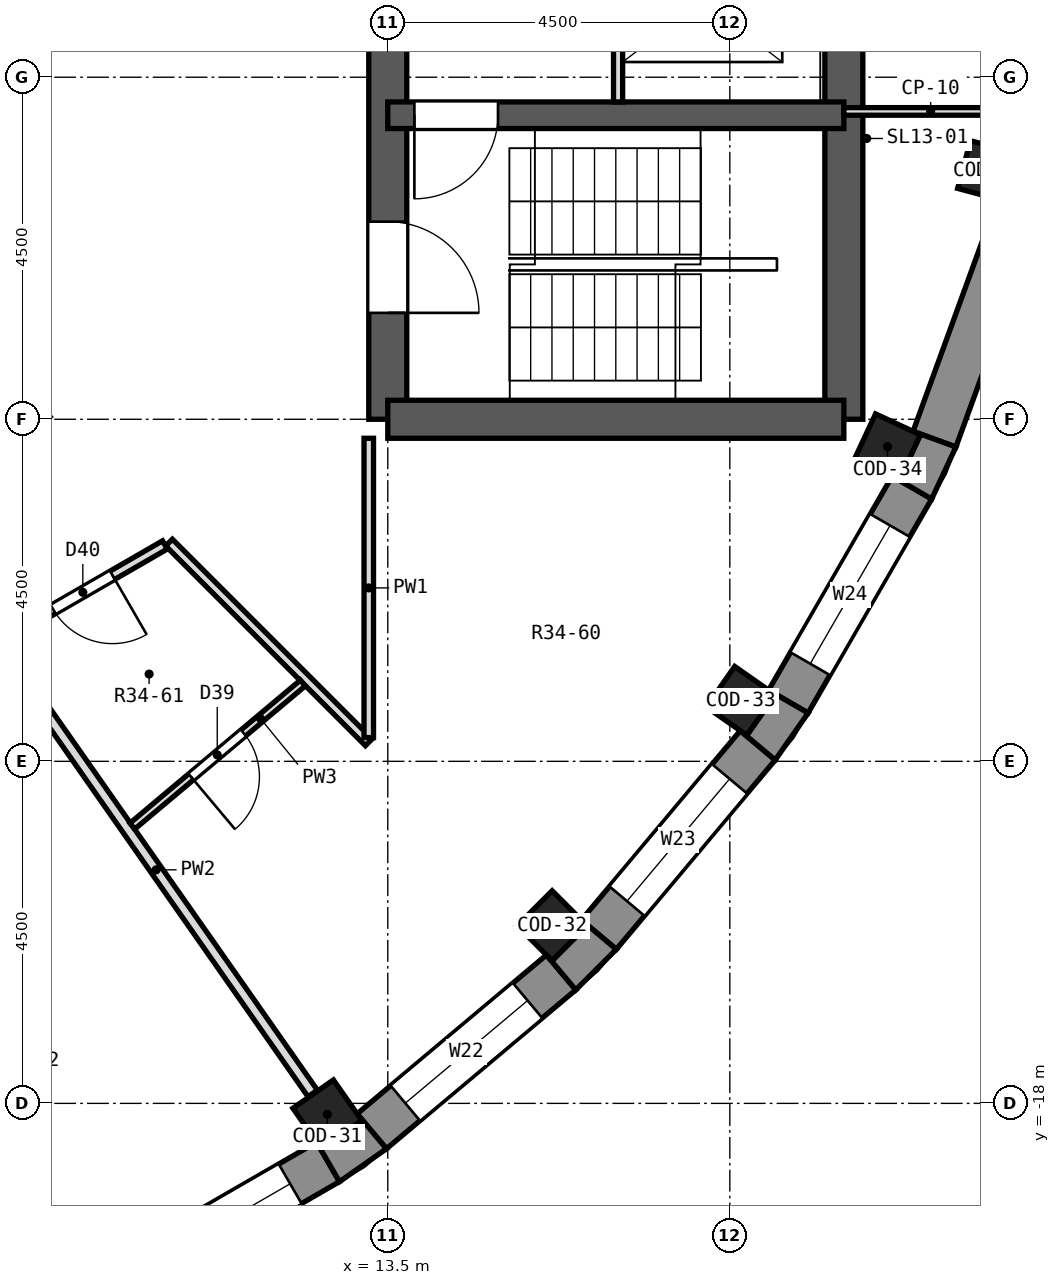
"""IFC4 building model, lengths in metres.
Left out: names, types, materials, properties, quantities, classifications, styles, units other than length and angle.
Written with IfcOpenShell. Run it as: python <this file> out.ifc"""

import sys

from ifc_helpers import new_model, si_unit, direction, frame, frame_2d, origin, origin_2d, place, context, subcontext, project, spatial, polyline, rectangle, outline, extrude, element, fill, save


model = new_model("IFC4")
c1 = context("Model", 3, precision=1e-05, world=origin(), true_north=direction((0.0, 1.0)))
c2 = subcontext(c1, "Body", "Model", "MODEL_VIEW")
j1 = project(units=[si_unit("LENGTHUNIT", "METRE"), si_unit("PLANEANGLEUNIT", "RADIAN")], contexts=[c1])
p1 = place(None, origin())
s1 = spatial("IfcSite", under=j1, at=p1, CompositionType="ELEMENT")
p2 = place(p1, origin())
s2 = spatial("IfcBuilding", under=s1, at=p2, CompositionType="ELEMENT")
p3 = place(p2, frame((0.0, 0.0, 239.6)))
s3 = spatial("IfcBuildingStorey", under=s2, at=p3, CompositionType="ELEMENT", Elevation=239.6)
for number, where, z_axis, x_axis in (
    (1, (12.705, -18.144, 0.0), (0.0, 0.0, 1.0), (0.574, -0.819, 0.0)),
    (2, (15.662, -15.662, 0.0), (0.0, 0.0, 1.0), (0.707, -0.707, 0.0)),
    (3, (18.144, -12.705, 0.0), (0.0, 0.0, 1.0), (0.819, -0.574, 0.0)),
    (4, (20.075, -9.361, 0.0), (0.0, 0.0, 1.0), (0.906, -0.423, 0.0)),
    (5, (21.395, -5.733, 0.0), (0.0, 0.0, 1.0), (0.966, -0.259, 0.0)),
):
    element("IfcColumn", number, at=place(p3, frame(where, z_axis=z_axis, x_axis=x_axis)), inside=s3, PredefinedType="COLUMN", context=c2, shape_type="SweptSolid", body=[
        extrude(rectangle(XDim=0.65, YDim=0.65, at=origin_2d()), origin(), (0.0, 0.0, 1.0), 3.3),
    ])
p4 = place(p3, frame((13.5, -9.0, 0.0), z_axis=(0.0, 0.0, 1.0), x_axis=(0.0, 1.0, 0.0)))
e6 = element("IfcWall", 6, at=p4, inside=s3, PredefinedType="SHEAR", context=c2, shape_type="SweptSolid", body=[
    extrude(rectangle(XDim=18.0, YDim=0.5, at=frame_2d((9.0, 0.0))), origin(), (0.0, 0.0, 1.0), 3.3),
])
p5 = place(p4, frame((15.4, 0.0, 0.0)))
e7 = element("IfcOpeningElement", 7, at=p5, cuts=e6, PredefinedType="OPENING", context=c2, shape_type="SweptSolid", body=[
    extrude(rectangle(XDim=1.2, YDim=2.1, at=frame_2d((0.6, 1.05))), frame((0.0, 0.262, 0.0), z_axis=(0.0, -1.0, 0.0), x_axis=(1.0, 0.0, 0.0)), (0.0, 0.0, 1.0), 0.524),
])
p6 = place(p4, frame((1.4, 0.0, 0.0)))
e8 = element("IfcOpeningElement", 8, at=p6, cuts=e6, PredefinedType="OPENING", context=c2, shape_type="SweptSolid", body=[
    extrude(rectangle(XDim=1.2, YDim=2.1, at=frame_2d((0.6, 1.05))), frame((0.0, 0.262, 0.0), z_axis=(0.0, -1.0, 0.0), x_axis=(1.0, 0.0, 0.0)), (0.0, 0.0, 1.0), 0.524),
])
p7 = place(p4, frame((7.5, 0.0, 0.0)))
e9 = element("IfcOpeningElement", 9, at=p7, cuts=e6, PredefinedType="OPENING", context=c2, shape_type="SweptSolid", body=[
    extrude(rectangle(XDim=3.0, YDim=2.4, at=frame_2d((1.5, 1.2))), frame((0.0, 0.262, 0.0), z_axis=(0.0, -1.0, 0.0), x_axis=(1.0, 0.0, 0.0)), (0.0, 0.0, 1.0), 0.524),
])
p8 = place(p3, frame((19.5, -9.0, 0.0), z_axis=(0.0, 0.0, 1.0), x_axis=(0.0, 1.0, 0.0)))
e10 = element("IfcWall", 10, at=p8, inside=s3, PredefinedType="SHEAR", context=c2, shape_type="SweptSolid", body=[
    extrude(rectangle(XDim=18.0, YDim=0.5, at=frame_2d((9.0, 0.0))), origin(), (0.0, 0.0, 1.0), 3.3),
])
p9 = place(p8, frame((9.45, 0.0, 0.0)))
e11 = element("IfcOpeningElement", 11, at=p9, cuts=e10, PredefinedType="OPENING", context=c2, shape_type="SweptSolid", body=[
    extrude(rectangle(XDim=0.9, YDim=2.1, at=frame_2d((0.45, 1.05))), frame((0.0, 0.262, 0.0), z_axis=(0.0, -1.0, 0.0), x_axis=(1.0, 0.0, 0.0)), (0.0, 0.0, 1.0), 0.524),
])
p10 = place(p8, frame((7.65, 0.0, 0.0)))
e12 = element("IfcOpeningElement", 12, at=p10, cuts=e10, PredefinedType="OPENING", context=c2, shape_type="SweptSolid", body=[
    extrude(rectangle(XDim=0.9, YDim=2.1, at=frame_2d((0.45, 1.05))), frame((0.0, 0.262, 0.0), z_axis=(0.0, -1.0, 0.0), x_axis=(1.0, 0.0, 0.0)), (0.0, 0.0, 1.0), 0.524),
])
p11 = place(p3, frame((13.5, -9.0, 0.0), z_axis=(0.0, 0.0, 1.0), x_axis=(1.0, 0.0, 0.0)))
e13 = element("IfcWall", 13, at=p11, inside=s3, PredefinedType="SHEAR", context=c2, shape_type="SweptSolid", body=[
    extrude(rectangle(XDim=6.0, YDim=0.5, at=frame_2d((3.0, 0.0))), origin(), (0.0, 0.0, 1.0), 3.3),
])
p12 = place(p3, frame((13.5, -5.0, 0.0), z_axis=(0.0, 0.0, 1.0), x_axis=(1.0, 0.0, 0.0)))
e14 = element("IfcWall", 14, at=p12, inside=s3, PredefinedType="SHEAR", context=c2, shape_type="SweptSolid", body=[
    extrude(rectangle(XDim=6.0, YDim=0.35, at=frame_2d((3.0, 0.0))), origin(), (0.0, 0.0, 1.0), 3.3),
])
p13 = place(p12, frame((0.35, 0.0, 0.0)))
e15 = element("IfcOpeningElement", 15, at=p13, cuts=e14, PredefinedType="OPENING", context=c2, shape_type="SweptSolid", body=[
    extrude(rectangle(XDim=1.1, YDim=2.1, at=frame_2d((0.55, 1.05))), frame((0.0, 0.187, 0.0), z_axis=(0.0, -1.0, 0.0), x_axis=(1.0, 0.0, 0.0)), (0.0, 0.0, 1.0), 0.374),
])
p14 = place(p3, frame((9.898, -20.396, 0.0), z_axis=(0.0, 0.0, 1.0), x_axis=(0.866016800201, 0.500014901547, 0.0)))
e16 = element("IfcWall", 16, at=p14, inside=s3, PredefinedType="SOLIDWALL", context=c2, shape_type="SweptSolid", body=[
    extrude(rectangle(XDim=3.252, YDim=0.6, at=frame_2d((1.626, 0.0))), origin(), (0.0, 0.0, 1.0), 2.9),
])
p15 = place(p14, frame((0.576, 0.0, 0.9)))
e17 = element("IfcOpeningElement", 17, at=p15, cuts=e16, PredefinedType="OPENING", context=c2, shape_type="SweptSolid", body=[
    extrude(rectangle(XDim=2.1, YDim=1.8, at=frame_2d((1.05, 0.9))), frame((0.0, 0.312, 0.0), z_axis=(0.0, -1.0, 0.0), x_axis=(1.0, 0.0, 0.0)), (0.0, 0.0, 1.0), 0.624),
])
p16 = place(p3, frame((13.29, -18.367, 0.0), z_axis=(0.0, 0.0, 1.0), x_axis=(0.766056773982, 0.64277291405, 0.0)))
e18 = element("IfcWall", 18, at=p16, inside=s3, PredefinedType="SOLIDWALL", context=c2, shape_type="SweptSolid", body=[
    extrude(rectangle(XDim=3.252, YDim=0.6, at=frame_2d((1.626, 0.0))), origin(), (0.0, 0.0, 1.0), 2.9),
])
p17 = place(p16, frame((0.576, 0.0, 0.9)))
e19 = element("IfcOpeningElement", 19, at=p17, cuts=e18, PredefinedType="OPENING", context=c2, shape_type="SweptSolid", body=[
    extrude(rectangle(XDim=2.1, YDim=1.8, at=frame_2d((1.05, 0.9))), frame((0.0, 0.312, 0.0), z_axis=(0.0, -1.0, 0.0), x_axis=(1.0, 0.0, 0.0)), (0.0, 0.0, 1.0), 0.624),
])
p18 = place(p3, frame((16.277, -15.781, 0.0), z_axis=(0.0, 0.0, 1.0), x_axis=(0.64277291405, 0.766056773982, 0.0)))
e20 = element("IfcWall", 20, at=p18, inside=s3, PredefinedType="SOLIDWALL", context=c2, shape_type="SweptSolid", body=[
    extrude(rectangle(XDim=3.252, YDim=0.6, at=frame_2d((1.626, 0.0))), origin(), (0.0, 0.0, 1.0), 2.9),
])
p19 = place(p18, frame((0.576, 0.0, 0.9)))
e21 = element("IfcOpeningElement", 21, at=p19, cuts=e20, PredefinedType="OPENING", context=c2, shape_type="SweptSolid", body=[
    extrude(rectangle(XDim=2.1, YDim=1.8, at=frame_2d((1.05, 0.9))), frame((0.0, 0.312, 0.0), z_axis=(0.0, -1.0, 0.0), x_axis=(1.0, 0.0, 0.0)), (0.0, 0.0, 1.0), 0.624),
])
p20 = place(p3, frame((18.77, -12.714, 0.0), z_axis=(0.0, 0.0, 1.0), x_axis=(0.500014901547, 0.866016800201, 0.0)))
e22 = element("IfcWall", 22, at=p20, inside=s3, PredefinedType="SOLIDWALL", context=c2, shape_type="SweptSolid", body=[
    extrude(rectangle(XDim=3.252, YDim=0.6, at=frame_2d((1.626, 0.0))), origin(), (0.0, 0.0, 1.0), 2.9),
])
p21 = place(p20, frame((0.576, 0.0, 0.9)))
e23 = element("IfcOpeningElement", 23, at=p21, cuts=e22, PredefinedType="OPENING", context=c2, shape_type="SweptSolid", body=[
    extrude(rectangle(XDim=2.1, YDim=1.8, at=frame_2d((1.05, 0.9))), frame((0.0, 0.312, 0.0), z_axis=(0.0, -1.0, 0.0), x_axis=(1.0, 0.0, 0.0)), (0.0, 0.0, 1.0), 0.624),
])
p22 = place(p3, frame((20.693, -9.262, 0.0), z_axis=(0.0, 0.0, 1.0), x_axis=(0.342056509473, 0.939679383794, 0.0)))
e24 = element("IfcWall", 24, at=p22, inside=s3, PredefinedType="SOLIDWALL", context=c2, shape_type="SweptSolid", body=[
    extrude(rectangle(XDim=3.252, YDim=0.6, at=frame_2d((1.626, 0.0))), origin(), (0.0, 0.0, 1.0), 2.9),
])
p23 = place(p3, origin())
e25 = element("IfcWall", 25, at=p23, inside=s3, PredefinedType="SOLIDWALL", context=c2, shape_type="SweptSolid", body=[
    extrude(outline(polyline([(12.864, -19.03), (13.482, -18.597), (13.097, -18.137), (13.157, -18.224), (12.625, -18.597), (12.564, -18.51), (12.864, -19.03)])), origin(), (0.0, 0.0, 1.0), 2.9),
])
p24 = place(p3, origin())
e26 = element("IfcWall", 26, at=p24, inside=s3, PredefinedType="SOLIDWALL", context=c2, shape_type="SweptSolid", body=[
    extrude(outline(polyline([(16.507, -15.973), (16.047, -15.588), (16.122, -15.662), (15.662, -16.122), (15.588, -16.047), (15.973, -16.507), (16.507, -15.973)])), origin(), (0.0, 0.0, 1.0), 2.9),
])
p25 = place(p3, origin())
e27 = element("IfcWall", 27, at=p25, inside=s3, PredefinedType="SOLIDWALL", context=c2, shape_type="SweptSolid", body=[
    extrude(outline(polyline([(19.03, -12.864), (18.51, -12.564), (18.597, -12.625), (18.224, -13.157), (18.137, -13.097), (18.597, -13.482), (19.03, -12.864)])), origin(), (0.0, 0.0, 1.0), 2.9),
])
p26 = place(p3, origin())
e28 = element("IfcWall", 28, at=p26, inside=s3, PredefinedType="SOLIDWALL", context=c2, shape_type="SweptSolid", body=[
    extrude(outline(polyline([(20.656, -10.048), (20.975, -9.364), (20.411, -9.159), (20.507, -9.204), (20.232, -9.793), (20.136, -9.748), (20.656, -10.048)])), origin(), (0.0, 0.0, 1.0), 2.9),
])
p27 = place(p3, frame((8.392, -11.985, 0.0), z_axis=(0.0, 0.0, 1.0), x_axis=(0.573619710388, -0.819121741779, 0.0)))
e29 = element("IfcWall", 29, at=p27, inside=s3, PredefinedType="PARTITIONING", context=c2, shape_type="SweptSolid", body=[
    extrude(rectangle(XDim=7.184, YDim=0.15, at=frame_2d((3.592, 0.0))), origin(), (0.0, 0.0, 1.0), 2.9),
])
p28 = place(p3, frame((10.622, -10.622, 0.0), z_axis=(0.0, 0.0, 1.0), x_axis=(0.707106781187, -0.707106781187, 0.0)))
e30 = element("IfcWall", 30, at=p28, inside=s3, PredefinedType="PARTITIONING", context=c2, shape_type="SweptSolid", body=[
    extrude(rectangle(XDim=3.717, YDim=0.125, at=frame_2d((1.858, 0.0))), origin(), (0.0, 0.0, 1.0), 2.9),
])
p29 = place(p3, frame((3.942, -14.479, 0.0), z_axis=(0.0, 0.0, 1.0), x_axis=(0.866021382195, 0.500006965533, 0.0)))
e31 = element("IfcWall", 31, at=p29, inside=s3, PredefinedType="PARTITIONING", context=c2, shape_type="SweptSolid", body=[
    extrude(rectangle(XDim=7.651, YDim=0.125, at=frame_2d((3.825, 0.0))), origin(), (0.0, 0.0, 1.0), 2.9),
])
p30 = place(p29, frame((5.954, 0.0, 0.0)))
e32 = element("IfcOpeningElement", 32, at=p30, cuts=e31, PredefinedType="OPENING", context=c2, shape_type="SweptSolid", body=[
    extrude(rectangle(XDim=0.9, YDim=2.1, at=frame_2d((0.45, 1.05))), frame((0.0, 0.074, 0.0), z_axis=(0.0, -1.0, 0.0), x_axis=(1.0, 0.0, 0.0)), (0.0, 0.0, 1.0), 0.149),
])
p31 = place(p3, frame((10.14, -14.352, 0.0), z_axis=(0.0, 0.0, 1.0), x_axis=(0.765946379397, 0.642904459378, 0.0)))
e33 = element("IfcWall", 33, at=p31, inside=s3, PredefinedType="PARTITIONING", context=c2, shape_type="SweptSolid", body=[
    extrude(rectangle(XDim=2.927, YDim=0.1, at=frame_2d((1.463, 0.0))), origin(), (0.0, 0.0, 1.0), 2.9),
])
p32 = place(p31, frame((1.007, 0.0, 0.0)))
e34 = element("IfcOpeningElement", 34, at=p32, cuts=e33, PredefinedType="OPENING", context=c2, shape_type="SweptSolid", body=[
    extrude(rectangle(XDim=0.9, YDim=2.1, at=frame_2d((0.45, 1.05))), frame((0.0, 0.062, 0.0), z_axis=(0.0, -1.0, 0.0), x_axis=(1.0, 0.0, 0.0)), (0.0, 0.0, 1.0), 0.124),
])
p33 = place(p3, frame((13.25, -13.188, 0.0), z_axis=(0.0, 0.0, 1.0), x_axis=(0.0, 1.0, 0.0)))
e35 = element("IfcWall", 35, at=p33, inside=s3, PredefinedType="PARTITIONING", context=c2, shape_type="SweptSolid", body=[
    extrude(rectangle(XDim=3.938, YDim=0.125, at=frame_2d((1.969, 0.0))), origin(), (0.0, 0.0, 1.0), 2.9),
])
p34 = place(p3, frame((19.5, -4.95, 0.0), z_axis=(0.0, 0.0, 1.0), x_axis=(1.0, 0.0, 0.0)))
e36 = element("IfcWall", 36, at=p34, inside=s3, PredefinedType="PARTITIONING", context=c2, shape_type="SweptSolid", body=[
    extrude(rectangle(XDim=2.284, YDim=0.1, at=frame_2d((1.142, 0.0))), origin(), (0.0, 0.0, 1.0), 2.9),
])
p35 = place(p3, frame((16.53, -4.825, 0.0), z_axis=(0.0, 0.0, 1.0), x_axis=(0.0, 1.0, 0.0)))
e37 = element("IfcWall", 37, at=p35, inside=s3, PredefinedType="PARTITIONING", context=c2, shape_type="SweptSolid", body=[
    extrude(rectangle(XDim=2.65, YDim=0.12, at=frame_2d((1.325, 0.0))), origin(), (0.0, 0.0, 1.0), 2.9),
])
p36 = place(p35, frame((0.775, 0.0, 0.0)))
e38 = element("IfcOpeningElement", 38, at=p36, cuts=e37, PredefinedType="OPENING", context=c2, shape_type="SweptSolid", body=[
    extrude(rectangle(XDim=1.1, YDim=2.1, at=frame_2d((0.55, 1.05))), frame((0.0, 0.072, 0.0), z_axis=(0.0, -1.0, 0.0), x_axis=(1.0, 0.0, 0.0)), (0.0, 0.0, 1.0), 0.144),
])
p37 = place(p15, origin())
e39 = element("IfcWindow", 39, at=p37, inside=s3, PartitioningType="SINGLE_PANEL", PredefinedType="WINDOW", context=c2, shape_type="SweptSolid", body=[
    extrude(rectangle(XDim=2.1, YDim=1.8, at=frame_2d((1.05, 0.9))), frame((0.0, 0.18, 0.0), z_axis=(0.0, -1.0, 0.0), x_axis=(1.0, 0.0, 0.0)), (0.0, 0.0, 1.0), 0.06),
])
fill(e17, e39)
p38 = place(p17, origin())
e40 = element("IfcWindow", 40, at=p38, inside=s3, PartitioningType="SINGLE_PANEL", PredefinedType="WINDOW", context=c2, shape_type="SweptSolid", body=[
    extrude(rectangle(XDim=2.1, YDim=1.8, at=frame_2d((1.05, 0.9))), frame((0.0, 0.18, 0.0), z_axis=(0.0, -1.0, 0.0), x_axis=(1.0, 0.0, 0.0)), (0.0, 0.0, 1.0), 0.06),
])
fill(e19, e40)
p39 = place(p19, origin())
e41 = element("IfcWindow", 41, at=p39, inside=s3, PartitioningType="SINGLE_PANEL", PredefinedType="WINDOW", context=c2, shape_type="SweptSolid", body=[
    extrude(rectangle(XDim=2.1, YDim=1.8, at=frame_2d((1.05, 0.9))), frame((0.0, 0.18, 0.0), z_axis=(0.0, -1.0, 0.0), x_axis=(1.0, 0.0, 0.0)), (0.0, 0.0, 1.0), 0.06),
])
fill(e21, e41)
p40 = place(p21, origin())
e42 = element("IfcWindow", 42, at=p40, inside=s3, PartitioningType="SINGLE_PANEL", PredefinedType="WINDOW", context=c2, shape_type="SweptSolid", body=[
    extrude(rectangle(XDim=2.1, YDim=1.8, at=frame_2d((1.05, 0.9))), frame((0.0, 0.18, 0.0), z_axis=(0.0, -1.0, 0.0), x_axis=(1.0, 0.0, 0.0)), (0.0, 0.0, 1.0), 0.06),
])
fill(e23, e42)
p41 = place(p32, frame((0.9, 0.0, 0.0), z_axis=(0.0, 0.0, 1.0), x_axis=(-1.0, 0.0, 0.0)))
e43 = element("IfcDoor", 43, at=p41, inside=s3, OperationType="SINGLE_SWING_RIGHT", PredefinedType="DOOR", context=c2, shape_type="SweptSolid", body=[
    extrude(rectangle(XDim=0.9, YDim=2.1, at=frame_2d((0.45, 1.05))), frame((0.0, 0.025, 0.0), z_axis=(0.0, -1.0, 0.0), x_axis=(1.0, 0.0, 0.0)), (0.0, 0.0, 1.0), 0.05),
])
fill(e34, e43)
p42 = place(p30, frame((0.9, 0.0, 0.0), z_axis=(0.0, 0.0, 1.0), x_axis=(-1.0, 0.0, 0.0)))
e44 = element("IfcDoor", 44, at=p42, inside=s3, OperationType="SINGLE_SWING_LEFT", PredefinedType="DOOR", context=c2, shape_type="SweptSolid", body=[
    extrude(rectangle(XDim=0.9, YDim=2.1, at=frame_2d((0.45, 1.05))), frame((0.0, 0.025, 0.0), z_axis=(0.0, -1.0, 0.0), x_axis=(1.0, 0.0, 0.0)), (0.0, 0.0, 1.0), 0.05),
])
fill(e32, e44)
p43 = place(p13, frame((1.1, 0.0, 0.0), z_axis=(0.0, 0.0, 1.0), x_axis=(-1.0, 0.0, 0.0)))
e45 = element("IfcDoor", 45, at=p43, inside=s3, OperationType="SINGLE_SWING_RIGHT", PredefinedType="DOOR", context=c2, shape_type="SweptSolid", body=[
    extrude(rectangle(XDim=1.1, YDim=2.1, at=frame_2d((0.55, 1.05))), frame((0.0, 0.025, 0.0), z_axis=(0.0, -1.0, 0.0), x_axis=(1.0, 0.0, 0.0)), (0.0, 0.0, 1.0), 0.05),
])
fill(e15, e45)
p44 = place(p6, frame((1.2, 0.0, 0.0), z_axis=(0.0, 0.0, 1.0), x_axis=(-1.0, 0.0, 0.0)))
e46 = element("IfcDoor", 46, at=p44, inside=s3, OperationType="SINGLE_SWING_RIGHT", PredefinedType="DOOR", context=c2, shape_type="SweptSolid", body=[
    extrude(rectangle(XDim=1.2, YDim=2.1, at=frame_2d((0.6, 1.05))), frame((0.0, 0.025, 0.0), z_axis=(0.0, -1.0, 0.0), x_axis=(1.0, 0.0, 0.0)), (0.0, 0.0, 1.0), 0.05),
])
fill(e8, e46)
save(model, sys.argv[1])
